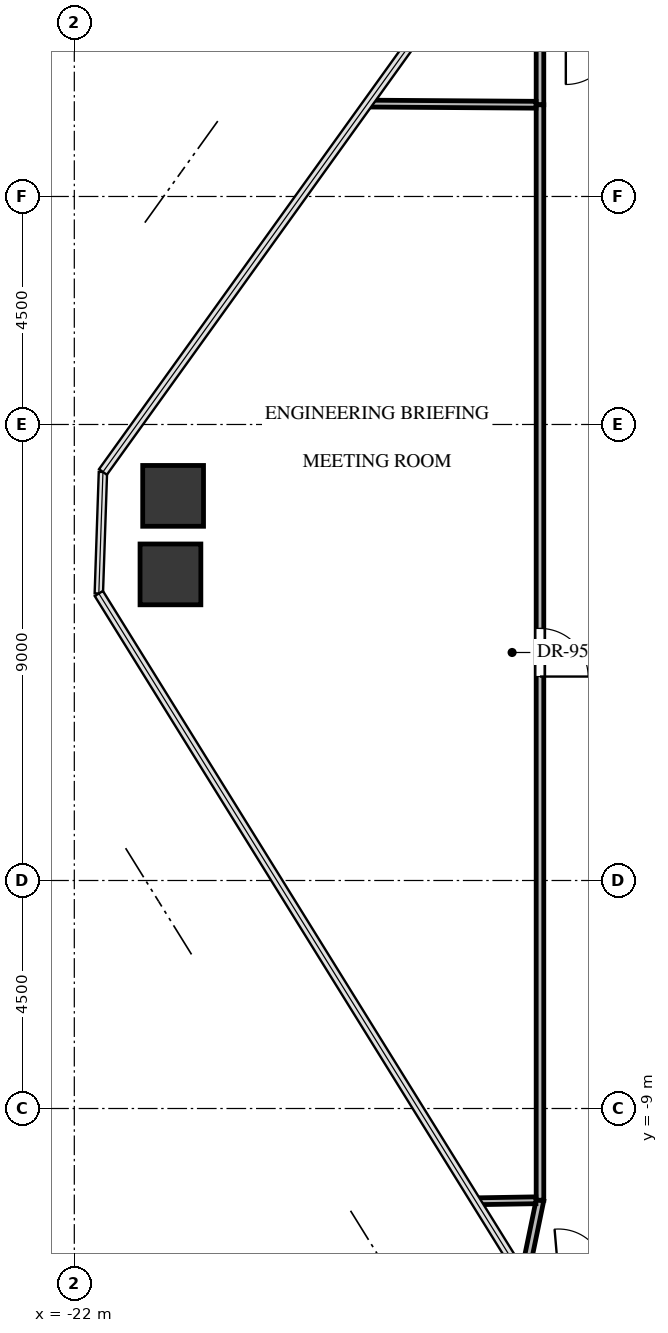
"""IFC4 building model, lengths in metres.
Left out: names, types, materials, properties, quantities, classifications, styles, units other than length and angle.
Written with IfcOpenShell. Run it as: python <this file> out.ifc"""

import sys

from ifc_helpers import new_model, si_unit, direction, frame, frame_2d, origin, origin_2d, place, context, subcontext, project, spatial, rectangle, extrude, source, transform, mapped, element, fill, save


model = new_model("IFC4")
c1 = context("Model", 3, precision=1e-05, world=origin(), true_north=direction((0.0, 1.0)))
c2 = subcontext(c1, "Body", "Model", "MODEL_VIEW")
j1 = project(units=[si_unit("LENGTHUNIT", "METRE"), si_unit("PLANEANGLEUNIT", "RADIAN")], contexts=[c1])
p1 = place(None, origin())
s1 = spatial("IfcSite", under=j1, at=p1, CompositionType="ELEMENT")
p2 = place(p1, origin())
s2 = spatial("IfcBuilding", under=s1, at=p2, CompositionType="ELEMENT")
p3 = place(p2, frame((0.0, 0.0, 104.1)))
s3 = spatial("IfcBuildingStorey", under=s2, at=p3, CompositionType="ELEMENT", Elevation=104.1)
m1 = source(origin(), c2, "Body", "SweptSolid", [
    extrude(rectangle(XDim=1.2, YDim=1.2, at=origin_2d()), origin(), (0.0, 0.0, 1.0), 3.3),
])
for number, where, z_axis, x_axis in (
    (1, (-20.103, 1.542, -0.24), (0.0, 0.0, 1.0), (1.0, 0.0, 0.0)),
    (2, (-20.05, 3.091, -0.24), (0.0, 0.0, 1.0), (1.0, 0.0, 0.0)),
):
    element("IfcColumn", number, at=place(p3, frame(where, z_axis=z_axis, x_axis=x_axis)), inside=s3, PredefinedType="COLUMN", context=c2, shape_type="MappedRepresentation", body=[
        mapped(m1, transform((0.0, 0.0, 0.0), x_axis=(1.0, 0.0, 0.0), y_axis=(0.0, 1.0, 0.0), z_axis=(0.0, 0.0, 1.0), scale=1.0)),
    ])
p4 = place(p3, frame((-12.81, 12.081, 0.0), z_axis=(0.0, 0.0, 1.0), x_axis=(0.0, -1.0, 0.0)))
e3 = element("IfcWall", 3, at=p4, inside=s3, PredefinedType="PARTITIONING", context=c2, shape_type="SweptSolid", body=[
    extrude(rectangle(XDim=1.271, YDim=0.15, at=frame_2d((0.635, 0.0))), origin(), (0.0, 0.0, 1.0), 3.045),
])
p5 = place(p3, frame((-12.81, -10.81, 0.0), z_axis=(0.0, 0.0, 1.0), x_axis=(-0.201786289638, -0.979429575474, 0.0)))
e4 = element("IfcWall", 4, at=p5, inside=s3, PredefinedType="PARTITIONING", context=c2, shape_type="SweptSolid", body=[
    extrude(rectangle(XDim=1.498, YDim=0.15, at=frame_2d((0.749, 0.0))), origin(), (0.0, 0.0, 1.0), 3.045),
])
p6 = place(p3, frame((-12.81, 10.81, 0.0), z_axis=(0.0, 0.0, 1.0), x_axis=(0.0, -1.0, 0.0)))
e5 = element("IfcWall", 5, at=p6, inside=s3, PredefinedType="PARTITIONING", context=c2, shape_type="SweptSolid", body=[
    extrude(rectangle(XDim=21.62, YDim=0.15, at=frame_2d((10.81, 0.0))), origin(), (0.0, 0.0, 1.0), 2.212),
])
p7 = place(p6, frame((10.335, 0.0, 0.0)))
e6 = element("IfcOpeningElement", 6, at=p7, cuts=e5, PredefinedType="OPENING", context=c2, shape_type="SweptSolid", body=[
    extrude(rectangle(XDim=0.95, YDim=2.1, at=frame_2d((0.475, 1.05))), frame((0.0, 0.085, 0.0), z_axis=(0.0, -1.0, 0.0), x_axis=(1.0, 0.0, 0.0)), (0.0, 0.0, 1.0), 0.17),
])
p8 = place(p3, frame((-12.889, 10.811, 0.0), z_axis=(0.0, 0.0, 1.0), x_axis=(-0.999976657862, 0.006832549348, 0.0)))
e7 = element("IfcWall", 7, at=p8, inside=s3, PredefinedType="PARTITIONING", context=c2, shape_type="SweptSolid", body=[
    extrude(rectangle(XDim=3.323, YDim=0.135, at=frame_2d((1.662, 0.0))), origin(), (0.0, 0.0, 1.0), 2.38),
])
p9 = place(p3, frame((-14.076, -10.831, 0.0), z_axis=(0.0, 0.0, 1.0), x_axis=(0.999860796611, 0.016684945308, 0.0)))
e8 = element("IfcWall", 8, at=p9, inside=s3, PredefinedType="PARTITIONING", context=c2, shape_type="SweptSolid", body=[
    extrude(rectangle(XDim=1.185, YDim=0.135, at=frame_2d((0.593, 0.0))), origin(), (0.0, 0.0, 1.0), 3.045),
])
m2 = source(origin(), c2, "Body", "SweptSolid", [
    extrude(rectangle(XDim=0.95, YDim=2.1, at=frame_2d((0.475, 1.05))), frame((0.0, 0.025, 0.0), z_axis=(0.0, -1.0, 0.0), x_axis=(1.0, 0.0, 0.0)), (0.0, 0.0, 1.0), 0.05),
])
p10 = place(p7, origin())
e9 = element("IfcDoor", 9, at=p10, inside=s3, OperationType="SINGLE_SWING_RIGHT", PredefinedType="DOOR", context=c2, shape_type="MappedRepresentation", body=[
    mapped(m2, transform((0.0, 0.0, 0.0), x_axis=(1.0, 0.0, 0.0), y_axis=(0.0, 1.0, 0.0), z_axis=(0.0, 0.0, 1.0), scale=1.0)),
])
fill(e6, e9)
save(model, sys.argv[1])
